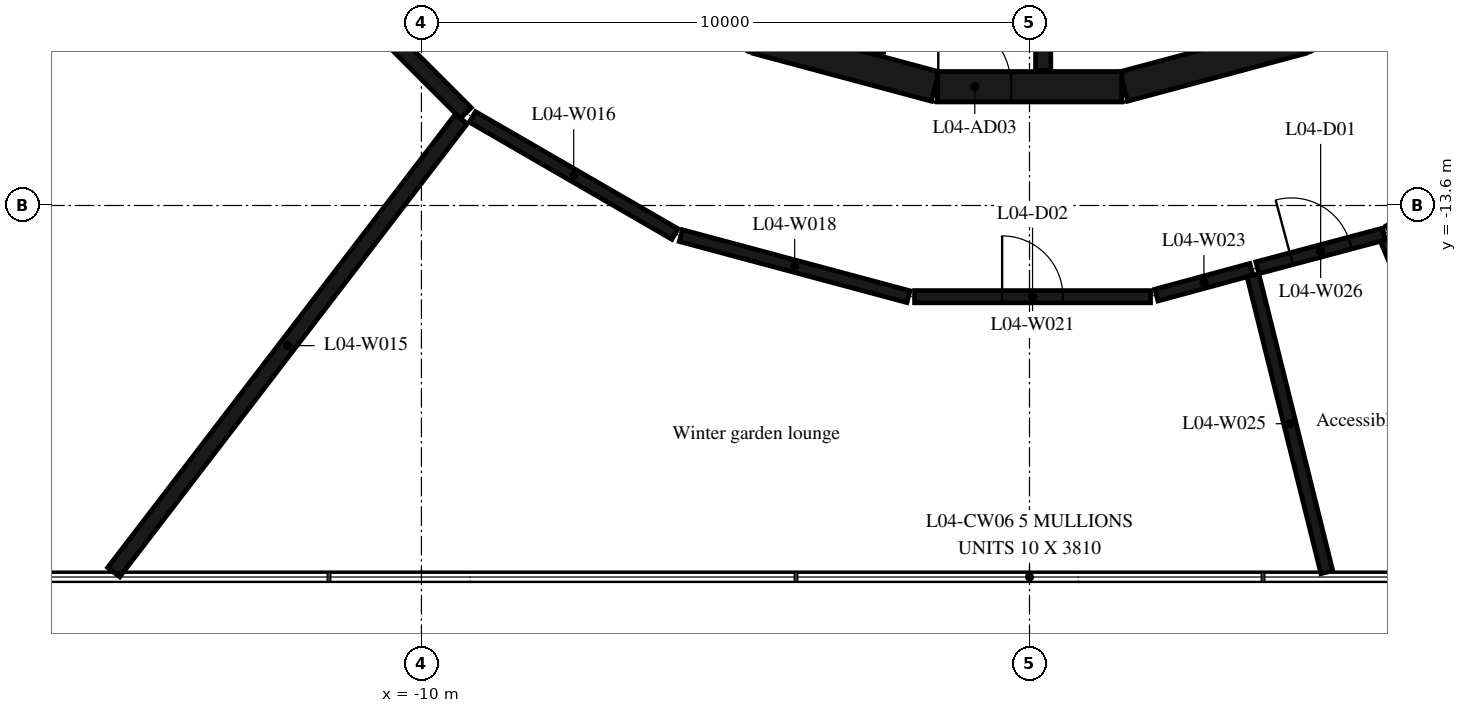
"""IFC4 building model, lengths in metres.
Left out: names, types, materials, properties, quantities, classifications, styles, units other than length and angle.
Written with IfcOpenShell. Run it as: python <this file> out.ifc"""

import sys

from ifc_helpers import new_model, si_unit, direction, frame, frame_2d, origin, place, context, subcontext, project, spatial, rectangle, extrude, element, fill, save


model = new_model("IFC4")
c1 = context("Model", 3, precision=1e-05, world=origin(), true_north=direction((0.0, 1.0)))
c2 = subcontext(c1, "Body", "Model", "MODEL_VIEW")
j1 = project(units=[si_unit("LENGTHUNIT", "METRE"), si_unit("PLANEANGLEUNIT", "RADIAN")], contexts=[c1])
p1 = place(None, origin())
s1 = spatial("IfcSite", under=j1, at=p1, CompositionType="ELEMENT")
p2 = place(p1, origin())
s2 = spatial("IfcBuilding", under=s1, at=p2, CompositionType="ELEMENT")
p3 = place(p2, frame((0.0, 0.0, 23.4)))
s3 = spatial("IfcBuildingStorey", under=s2, at=p3, CompositionType="ELEMENT", Elevation=23.4)
for number, where, z_axis, x_axis in (
    (1, (1.55, -11.643, 0.0), (0.0, 0.0, 1.0), (0.966, 0.259, 0.0)),
    (2, (-4.479, -10.858, 0.0), (0.0, 0.0, 1.0), (0.966, -0.259, 0.0)),
):
    element("IfcWall", number, at=place(p3, frame(where, z_axis=z_axis, x_axis=x_axis)), inside=s3, PredefinedType="SHEAR", context=c2, shape_type="SweptSolid", body=[
        extrude(rectangle(XDim=3.033, YDim=0.5, at=frame_2d((1.516, 0.0))), origin(), (0.0, 0.0, 1.0), 4.42),
    ])
p4 = place(p3, frame((-1.516, -11.647, 0.0), z_axis=(0.0, 0.0, 1.0), x_axis=(1.0, 0.0, 0.0)))
e3 = element("IfcWall", 3, at=p4, inside=s3, PredefinedType="SHEAR", context=c2, shape_type="SweptSolid", body=[
    extrude(rectangle(XDim=3.033, YDim=0.5, at=frame_2d((1.516, 0.0))), origin(), (0.0, 0.0, 1.0), 4.42),
])
p5 = place(p4, frame((0.016, 0.0, 0.0)))
e4 = element("IfcOpeningElement", 4, at=p5, cuts=e3, PredefinedType="OPENING", context=c2, shape_type="SweptSolid", body=[
    extrude(rectangle(XDim=1.2, YDim=2.1, at=frame_2d((0.6, 1.05))), frame((0.0, 0.26, 0.0), z_axis=(0.0, -1.0, 0.0), x_axis=(1.0, 0.0, 0.0)), (0.0, 0.0, 1.0), 0.52),
])
p6 = place(p3, frame((0.225, -8.97, 0.0), z_axis=(0.0, 0.0, 1.0), x_axis=(0.0, -1.0, 0.0)))
e5 = element("IfcWall", 5, at=p6, inside=s3, PredefinedType="SHEAR", context=c2, shape_type="SweptSolid", body=[
    extrude(rectangle(XDim=2.41, YDim=0.25, at=frame_2d((1.205, 0.0))), origin(), (0.0, 0.0, 1.0), 4.42),
])
p7 = place(p3, frame((-14.162, -5.868, 0.0), z_axis=(0.0, 0.0, 1.0), x_axis=(-0.923914077449, -0.382600022859, 0.0)))
e6 = element("IfcWall", 6, at=p7, inside=s3, PredefinedType="PARTITIONING", context=c2, shape_type="SweptSolid", body=[
    extrude(rectangle(XDim=15.085, YDim=0.25, at=frame_2d((7.543, 0.0))), origin(), (0.0, 0.0, 1.0), 4.42),
])
p8 = place(p3, frame((-11.992, -9.358, 0.0), z_axis=(0.0, 0.0, 1.0), x_axis=(0.707106781187, -0.707106781187, 0.0)))
e7 = element("IfcWall", 7, at=p8, inside=s3, PredefinedType="PARTITIONING", context=c2, shape_type="SweptSolid", body=[
    extrude(rectangle(XDim=3.849, YDim=0.25, at=frame_2d((1.925, 0.0))), origin(), (0.0, 0.0, 1.0), 4.42),
])
p9 = place(p3, frame((-9.346, -12.179, 0.0), z_axis=(0.0, 0.0, 1.0), x_axis=(-0.608560359422, -0.793507585937, 0.0)))
e8 = element("IfcWall", 8, at=p9, inside=s3, PredefinedType="PARTITIONING", context=c2, shape_type="SweptSolid", body=[
    extrude(rectangle(XDim=9.39, YDim=0.25, at=frame_2d((4.695, 0.0))), origin(), (0.0, 0.0, 1.0), 4.42),
])
p10 = place(p3, frame((-9.162, -12.143, 0.0), z_axis=(0.0, 0.0, 1.0), x_axis=(0.865588360659, -0.500756218026, 0.0)))
e9 = element("IfcWall", 9, at=p10, inside=s3, PredefinedType="PARTITIONING", context=c2, shape_type="SweptSolid", body=[
    extrude(rectangle(XDim=3.849, YDim=0.2, at=frame_2d((1.925, 0.0))), origin(), (0.0, 0.0, 1.0), 4.42),
])
p11 = place(p3, frame((-5.733, -14.096, 0.0), z_axis=(0.0, 0.0, 1.0), x_axis=(0.96585437197, -0.259085569159, 0.0)))
e10 = element("IfcWall", 10, at=p11, inside=s3, PredefinedType="PARTITIONING", context=c2, shape_type="SweptSolid", body=[
    extrude(rectangle(XDim=3.876, YDim=0.2, at=frame_2d((1.938, 0.0))), origin(), (0.0, 0.0, 1.0), 4.42),
])
p12 = place(p3, frame((-1.89, -15.1, 0.0), z_axis=(0.0, 0.0, 1.0), x_axis=(1.0, 0.0, 0.0)))
e11 = element("IfcWall", 11, at=p12, inside=s3, PredefinedType="PARTITIONING", context=c2, shape_type="SweptSolid", body=[
    extrude(rectangle(XDim=3.88, YDim=0.2, at=frame_2d((1.94, 0.0))), origin(), (0.0, 0.0, 1.0), 4.42),
])
p13 = place(p12, frame((1.44, 0.0, 0.0)))
e12 = element("IfcOpeningElement", 12, at=p13, cuts=e11, PredefinedType="OPENING", context=c2, shape_type="SweptSolid", body=[
    extrude(rectangle(XDim=1.0, YDim=2.1, at=frame_2d((0.5, 1.05))), frame((0.0, 0.11, 0.0), z_axis=(0.0, -1.0, 0.0), x_axis=(1.0, 0.0, 0.0)), (0.0, 0.0, 1.0), 0.22),
])
p14 = place(p3, frame((2.086, -15.074, 0.0), z_axis=(0.0, 0.0, 1.0), x_axis=(0.965166134243, 0.261637790295, 0.0)))
e13 = element("IfcWall", 13, at=p14, inside=s3, PredefinedType="PARTITIONING", context=c2, shape_type="SweptSolid", body=[
    extrude(rectangle(XDim=1.62, YDim=0.2, at=frame_2d((0.81, 0.0))), origin(), (0.0, 0.0, 1.0), 4.42),
])
p15 = place(p3, frame((3.674, -14.747, 0.0), z_axis=(0.0, 0.0, 1.0), x_axis=(0.241622227784, -0.970370392706, 0.0)))
e14 = element("IfcWall", 14, at=p15, inside=s3, PredefinedType="PARTITIONING", context=c2, shape_type="SweptSolid", body=[
    extrude(rectangle(XDim=5.032, YDim=0.2, at=frame_2d((2.516, 0.0))), origin(), (0.0, 0.0, 1.0), 4.42),
])
p16 = place(p3, frame((3.747, -14.624, 0.0), z_axis=(0.0, 0.0, 1.0), x_axis=(0.966396387697, 0.257056456535, 0.0)))
e15 = element("IfcWall", 15, at=p16, inside=s3, PredefinedType="PARTITIONING", context=c2, shape_type="SweptSolid", body=[
    extrude(rectangle(XDim=2.156, YDim=0.2, at=frame_2d((1.078, 0.0))), origin(), (0.0, 0.0, 1.0), 4.42),
])
p17 = place(p16, frame((0.578, 0.0, 0.0)))
e16 = element("IfcOpeningElement", 16, at=p17, cuts=e15, PredefinedType="OPENING", context=c2, shape_type="SweptSolid", body=[
    extrude(rectangle(XDim=1.0, YDim=2.1, at=frame_2d((0.5, 1.05))), frame((0.0, 0.11, 0.0), z_axis=(0.0, -1.0, 0.0), x_axis=(1.0, 0.0, 0.0)), (0.0, 0.0, 1.0), 0.22),
])
p18 = place(p3, frame((5.868, -14.162, 0.0), z_axis=(0.0, 0.0, 1.0), x_axis=(0.382249745869, -0.924059052108, 0.0)))
e17 = element("IfcWall", 17, at=p18, inside=s3, PredefinedType="PARTITIONING", context=c2, shape_type="SweptSolid", body=[
    extrude(rectangle(XDim=5.917, YDim=0.2, at=frame_2d((2.958, 0.0))), origin(), (0.0, 0.0, 1.0), 4.42),
])
p19 = place(p3, frame((5.917, -14.02, 0.0), z_axis=(0.0, 0.0, 1.0), x_axis=(0.865601686425, 0.500733182901, 0.0)))
e18 = element("IfcWall", 18, at=p19, inside=s3, PredefinedType="PARTITIONING", context=c2, shape_type="SweptSolid", body=[
    extrude(rectangle(XDim=3.874, YDim=0.2, at=frame_2d((1.937, 0.0))), origin(), (0.0, 0.0, 1.0), 4.42),
])
p20 = place(p19, frame((1.437, 0.0, 0.0)))
e19 = element("IfcOpeningElement", 19, at=p20, cuts=e18, PredefinedType="OPENING", context=c2, shape_type="SweptSolid", body=[
    extrude(rectangle(XDim=1.0, YDim=2.1, at=frame_2d((0.5, 1.05))), frame((0.0, 0.11, 0.0), z_axis=(0.0, -1.0, 0.0), x_axis=(1.0, 0.0, 0.0)), (0.0, 0.0, 1.0), 0.22),
])
p21 = place(p5, origin())
e20 = element("IfcDoor", 20, at=p21, inside=s3, OperationType="SINGLE_SWING_RIGHT", PredefinedType="DOOR", context=c2, shape_type="SweptSolid", body=[
    extrude(rectangle(XDim=1.2, YDim=2.1, at=frame_2d((0.6, 1.05))), frame((0.0, 0.025, 0.0), z_axis=(0.0, -1.0, 0.0), x_axis=(1.0, 0.0, 0.0)), (0.0, 0.0, 1.0), 0.05),
])
fill(e4, e20)
p22 = place(p17, origin())
e21 = element("IfcDoor", 21, at=p22, inside=s3, OperationType="SINGLE_SWING_LEFT", PredefinedType="DOOR", context=c2, shape_type="SweptSolid", body=[
    extrude(rectangle(XDim=1.0, YDim=2.1, at=frame_2d((0.5, 1.05))), frame((0.0, 0.025, 0.0), z_axis=(0.0, -1.0, 0.0), x_axis=(1.0, 0.0, 0.0)), (0.0, 0.0, 1.0), 0.05),
])
fill(e16, e21)
p23 = place(p13, origin())
e22 = element("IfcDoor", 22, at=p23, inside=s3, OperationType="SINGLE_SWING_LEFT", PredefinedType="DOOR", context=c2, shape_type="SweptSolid", body=[
    extrude(rectangle(XDim=1.0, YDim=2.1, at=frame_2d((0.5, 1.05))), frame((0.0, 0.025, 0.0), z_axis=(0.0, -1.0, 0.0), x_axis=(1.0, 0.0, 0.0)), (0.0, 0.0, 1.0), 0.05),
])
fill(e12, e22)
save(model, sys.argv[1])
